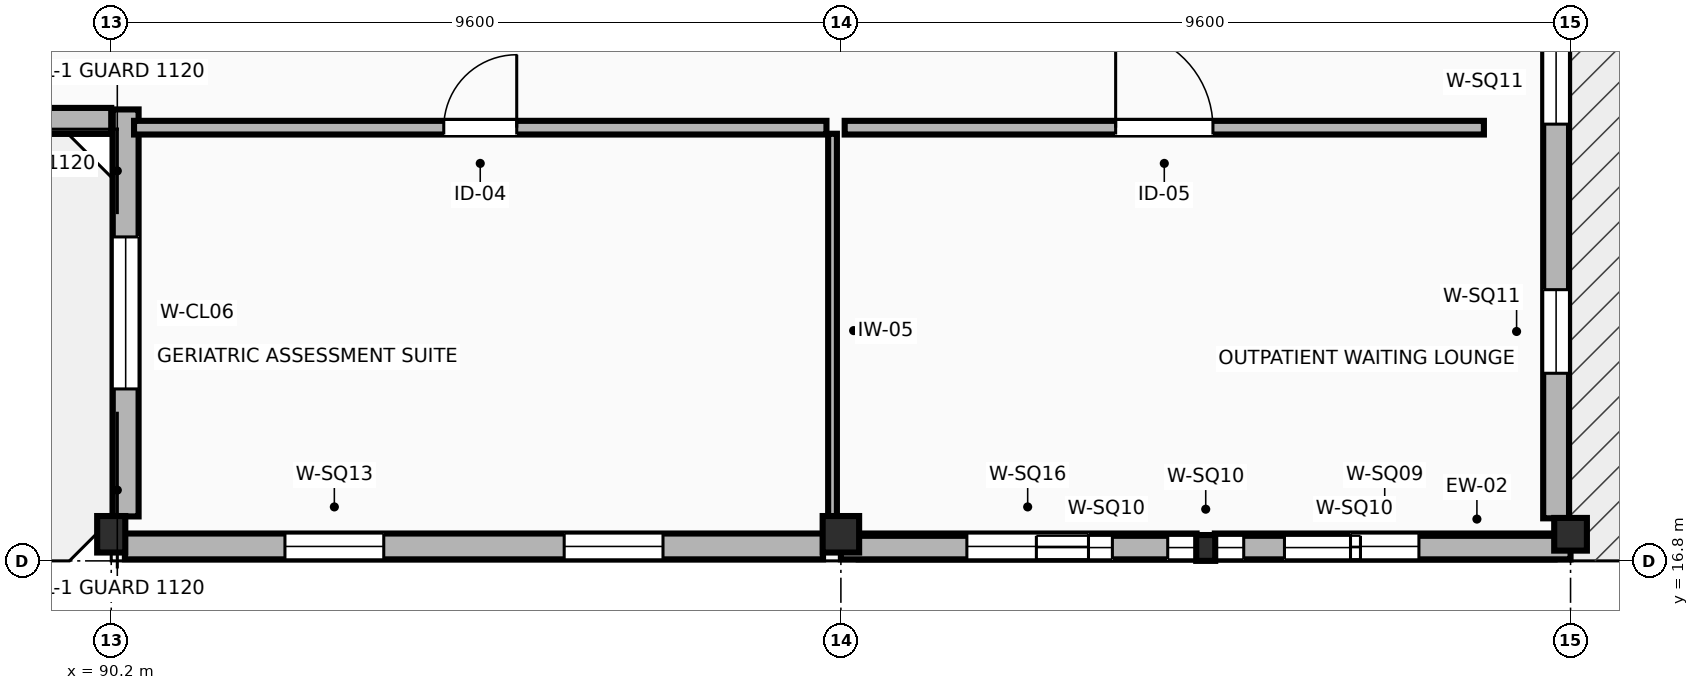
"""IFC4 building model, lengths in metres.
Left out: names, types, materials, properties, quantities, classifications, styles, units other than length and angle.
Written with IfcOpenShell. Run it as: python <this file> out.ifc"""

import sys

from ifc_helpers import new_model, si_unit, direction, frame, frame_2d, origin, origin_2d, place, context, subcontext, project, spatial, polyline, rectangle, outline, extrude, element, fill, save


model = new_model("IFC4")
c1 = context("Model", 3, precision=1e-05, world=origin(), true_north=direction((0.0, 1.0)))
c2 = subcontext(c1, "Body", "Model", "MODEL_VIEW")
j1 = project(units=[si_unit("LENGTHUNIT", "METRE"), si_unit("PLANEANGLEUNIT", "RADIAN")], contexts=[c1])
p1 = place(None, origin())
s1 = spatial("IfcSite", under=j1, at=p1, CompositionType="ELEMENT")
p2 = place(p1, origin())
s2 = spatial("IfcBuilding", under=s1, at=p2, CompositionType="ELEMENT")
p3 = place(p2, frame((0.0, 0.0, 18.0)))
s3 = spatial("IfcBuildingStorey", under=s2, at=p3, CompositionType="ELEMENT", Elevation=18.0)
p4 = place(p3, frame((90.2, 17.15, 0.0), z_axis=(0.0, 0.0, 1.0), x_axis=(1.0, 0.0, 0.0)))
e1 = element("IfcColumn", 1, at=p4, inside=s3, PredefinedType="COLUMN", context=c2, shape_type="SweptSolid", body=[
    extrude(rectangle(XDim=0.37, YDim=0.48, at=origin_2d()), origin(), (0.0, 0.0, 1.0), 4.2),
])
p5 = place(p3, frame((99.8, 17.15, 0.0), z_axis=(0.0, 0.0, 1.0), x_axis=(1.0, 0.0, 0.0)))
e2 = element("IfcColumn", 2, at=p5, inside=s3, PredefinedType="COLUMN", context=c2, shape_type="SweptSolid", body=[
    extrude(rectangle(XDim=0.48, YDim=0.48, at=origin_2d()), origin(), (0.0, 0.0, 1.0), 4.2),
])
p6 = place(p3, frame((109.4, 17.15, 0.0), z_axis=(0.0, 0.0, 1.0), x_axis=(1.0, 0.0, 0.0)))
e3 = element("IfcColumn", 3, at=p6, inside=s3, PredefinedType="COLUMN", context=c2, shape_type="SweptSolid", body=[
    extrude(rectangle(XDim=0.43, YDim=0.43, at=origin_2d()), origin(), (0.0, 0.0, 1.0), 4.2),
])
p7 = place(p3, frame((104.6, 16.97, 0.0), z_axis=(0.0, 0.0, 1.0), x_axis=(1.0, 0.0, 0.0)))
e4 = element("IfcColumn", 4, at=p7, inside=s3, PredefinedType="PILASTER", context=c2, shape_type="SweptSolid", body=[
    extrude(rectangle(XDim=0.25, YDim=0.34, at=origin_2d()), origin(), (0.0, 0.0, 1.0), 4.2),
])
p8 = place(p3, frame((80.6, 22.59, 0.0), z_axis=(0.0, 0.0, 1.0), x_axis=(1.0, 0.0, 0.0)))
e5 = element("IfcWall", 5, at=p8, inside=s3, PredefinedType="STANDARD", context=c2, shape_type="SweptSolid", body=[
    extrude(rectangle(XDim=9.6, YDim=0.34, at=frame_2d((4.8, 0.0))), origin(), (0.0, 0.0, 1.0), 3.94),
])
p9 = place(p8, frame((2.205, 0.0, 0.95)))
e6 = element("IfcOpeningElement", 6, at=p9, cuts=e5, PredefinedType="OPENING", context=c2, shape_type="SweptSolid", body=[
    extrude(rectangle(XDim=1.35, YDim=1.6, at=frame_2d((0.675, 0.8))), frame((0.0, 0.18, 0.0), z_axis=(0.0, -1.0, 0.0), x_axis=(1.0, 0.0, 0.0)), (0.0, 0.0, 1.0), 0.36),
])
p10 = place(p8, frame((6.045, 0.0, 0.95)))
e7 = element("IfcOpeningElement", 7, at=p10, cuts=e5, PredefinedType="OPENING", context=c2, shape_type="SweptSolid", body=[
    extrude(rectangle(XDim=1.35, YDim=1.6, at=frame_2d((0.675, 0.8))), frame((0.0, 0.18, 0.0), z_axis=(0.0, -1.0, 0.0), x_axis=(1.0, 0.0, 0.0)), (0.0, 0.0, 1.0), 0.36),
])
p11 = place(p3, frame((90.39, 22.74, 0.0), z_axis=(0.0, 0.0, 1.0), x_axis=(0.0, -1.0, 0.0)))
e8 = element("IfcWall", 8, at=p11, inside=s3, PredefinedType="STANDARD", context=c2, shape_type="SweptSolid", body=[
    extrude(rectangle(XDim=5.355, YDim=0.34, at=frame_2d((2.677, 0.0))), origin(), (0.0, 0.0, 1.0), 3.425),
])
p12 = place(p11, frame((1.677, 0.0, 0.95)))
e9 = element("IfcOpeningElement", 9, at=p12, cuts=e8, PredefinedType="OPENING", context=c2, shape_type="SweptSolid", body=[
    extrude(rectangle(XDim=2.0, YDim=1.6, at=frame_2d((1.0, 0.8))), frame((0.0, 0.18, 0.0), z_axis=(0.0, -1.0, 0.0), x_axis=(1.0, 0.0, 0.0)), (0.0, 0.0, 1.0), 0.36),
])
p13 = place(p3, frame((90.38, 16.99, 0.0), z_axis=(0.0, 0.0, 1.0), x_axis=(1.0, 0.0, 0.0)))
e10 = element("IfcWall", 10, at=p13, inside=s3, PredefinedType="STANDARD", context=c2, shape_type="SweptSolid", body=[
    extrude(rectangle(XDim=9.185, YDim=0.34, at=frame_2d((4.593, 0.0))), origin(), (0.0, 0.0, 1.0), 3.205),
])
p14 = place(p13, frame((2.105, 0.0, 0.95)))
e11 = element("IfcOpeningElement", 11, at=p14, cuts=e10, PredefinedType="OPENING", context=c2, shape_type="SweptSolid", body=[
    extrude(rectangle(XDim=1.3, YDim=1.3, at=frame_2d((0.65, 0.65))), frame((0.0, 0.18, 0.0), z_axis=(0.0, -1.0, 0.0), x_axis=(1.0, 0.0, 0.0)), (0.0, 0.0, 1.0), 0.36),
])
p15 = place(p13, frame((5.78, 0.0, 0.95)))
e12 = element("IfcOpeningElement", 12, at=p15, cuts=e10, PredefinedType="OPENING", context=c2, shape_type="SweptSolid", body=[
    extrude(rectangle(XDim=1.3, YDim=1.3, at=frame_2d((0.65, 0.65))), frame((0.0, 0.18, 0.0), z_axis=(0.0, -1.0, 0.0), x_axis=(1.0, 0.0, 0.0)), (0.0, 0.0, 1.0), 0.36),
])
p16 = place(p3, frame((100.035, 16.99, 0.0), z_axis=(0.0, 0.0, 1.0), x_axis=(1.0, 0.0, 0.0)))
e13 = element("IfcWall", 13, at=p16, inside=s3, PredefinedType="STANDARD", context=c2, shape_type="SweptSolid", body=[
    extrude(rectangle(XDim=4.445, YDim=0.34, at=frame_2d((2.223, 0.0))), origin(), (0.0, 0.0, 1.0), 3.94),
])
p17 = place(p16, frame((1.423, 0.0, 1.15)))
e14 = element("IfcOpeningElement", 14, at=p17, cuts=e13, PredefinedType="OPENING", context=c2, shape_type="SweptSolid", body=[
    extrude(rectangle(XDim=1.6, YDim=1.6, at=frame_2d((0.8, 0.8))), frame((0.0, 0.18, 0.0), z_axis=(0.0, -1.0, 0.0), x_axis=(1.0, 0.0, 0.0)), (0.0, 0.0, 1.0), 0.36),
])
p18 = place(p3, frame((104.72, 16.99, 0.0), z_axis=(0.0, 0.0, 1.0), x_axis=(1.0, 0.0, 0.0)))
e15 = element("IfcWall", 15, at=p18, inside=s3, PredefinedType="STANDARD", context=c2, shape_type="SweptSolid", body=[
    extrude(rectangle(XDim=4.47, YDim=0.34, at=frame_2d((2.235, 0.0))), origin(), (0.0, 0.0, 1.0), 3.94),
])
p19 = place(p18, frame((1.785, 0.0, 1.15)))
e16 = element("IfcOpeningElement", 16, at=p19, cuts=e15, PredefinedType="OPENING", context=c2, shape_type="SweptSolid", body=[
    extrude(rectangle(XDim=0.9, YDim=0.9, at=frame_2d((0.45, 0.45))), frame((0.0, 0.18, 0.0), z_axis=(0.0, -1.0, 0.0), x_axis=(1.0, 0.0, 0.0)), (0.0, 0.0, 1.0), 0.36),
])
p20 = place(p3, frame((109.21, 17.36, 0.0), z_axis=(0.0, 0.0, 1.0), x_axis=(0.0, 1.0, 0.0)))
e17 = element("IfcWall", 17, at=p20, inside=s3, PredefinedType="STANDARD", context=c2, shape_type="SweptSolid", body=[
    extrude(rectangle(XDim=8.195, YDim=0.34, at=frame_2d((4.097, 0.0))), origin(), (0.0, 0.0, 1.0), 3.035),
])
p21 = place(p20, frame((1.908, 0.0, 1.15)))
e18 = element("IfcOpeningElement", 18, at=p21, cuts=e17, PredefinedType="OPENING", context=c2, shape_type="SweptSolid", body=[
    extrude(rectangle(XDim=1.1, YDim=1.1, at=frame_2d((0.55, 0.55))), frame((0.0, 0.18, 0.0), z_axis=(0.0, -1.0, 0.0), x_axis=(1.0, 0.0, 0.0)), (0.0, 0.0, 1.0), 0.36),
])
p22 = place(p20, frame((5.187, 0.0, 1.15)))
e19 = element("IfcOpeningElement", 19, at=p22, cuts=e17, PredefinedType="OPENING", context=c2, shape_type="SweptSolid", body=[
    extrude(rectangle(XDim=1.1, YDim=1.1, at=frame_2d((0.55, 0.55))), frame((0.0, 0.18, 0.0), z_axis=(0.0, -1.0, 0.0), x_axis=(1.0, 0.0, 0.0)), (0.0, 0.0, 1.0), 0.36),
])
p23 = place(p3, frame((99.8, 16.975, 4.2), z_axis=(0.0, 0.0, 1.0), x_axis=(1.0, 0.0, 0.0)))
e20 = element("IfcWall", 20, at=p23, inside=s3, PredefinedType="STANDARD", context=c2, shape_type="SweptSolid", body=[
    extrude(outline(polyline([(0.0, 0.0), (9.6, 0.0), (9.6, 0.0), (4.8, 8.19), (0.0, 0.0), (0.0, 0.0)])), frame((0.0, 0.155, 0.0), z_axis=(0.0, -1.0, 0.0), x_axis=(1.0, 0.0, 0.0)), (0.0, 0.0, 1.0), 0.31),
])
p24 = place(p23, frame((2.572, 0.0, 0.75)))
e21 = element("IfcOpeningElement", 21, at=p24, cuts=e20, PredefinedType="OPENING", context=c2, shape_type="SweptSolid", body=[
    extrude(rectangle(XDim=1.0, YDim=1.0, at=frame_2d((0.5, 0.5))), frame((0.0, 0.165, 0.0), z_axis=(0.0, -1.0, 0.0), x_axis=(1.0, 0.0, 0.0)), (0.0, 0.0, 1.0), 0.33),
])
p25 = place(p23, frame((5.836, 0.0, 1.55)))
e22 = element("IfcOpeningElement", 22, at=p25, cuts=e20, PredefinedType="OPENING", context=c2, shape_type="SweptSolid", body=[
    extrude(rectangle(XDim=1.0, YDim=1.0, at=frame_2d((0.5, 0.5))), frame((0.0, 0.165, 0.0), z_axis=(0.0, -1.0, 0.0), x_axis=(1.0, 0.0, 0.0)), (0.0, 0.0, 1.0), 0.33),
])
p26 = place(p23, frame((4.3, 0.0, 3.35)))
e23 = element("IfcOpeningElement", 23, at=p26, cuts=e20, PredefinedType="OPENING", context=c2, shape_type="SweptSolid", body=[
    extrude(rectangle(XDim=1.0, YDim=1.0, at=frame_2d((0.5, 0.5))), frame((0.0, 0.165, 0.0), z_axis=(0.0, -1.0, 0.0), x_axis=(1.0, 0.0, 0.0)), (0.0, 0.0, 1.0), 0.33),
])
p27 = place(p3, frame((90.5, 22.5, 0.0), z_axis=(0.0, 0.0, 1.0), x_axis=(1.0, 0.0, 0.0)))
e24 = element("IfcWall", 24, at=p27, inside=s3, PredefinedType="PARTITIONING", context=c2, shape_type="SweptSolid", body=[
    extrude(rectangle(XDim=9.11, YDim=0.18, at=frame_2d((4.555, 0.0))), origin(), (0.0, 0.0, 1.0), 3.94),
])
p28 = place(p27, frame((4.075, 0.0, 0.0)))
e25 = element("IfcOpeningElement", 25, at=p28, cuts=e24, PredefinedType="OPENING", context=c2, shape_type="SweptSolid", body=[
    extrude(rectangle(XDim=0.96, YDim=2.1, at=frame_2d((0.48, 1.05))), frame((0.0, 0.1, 0.0), z_axis=(0.0, -1.0, 0.0), x_axis=(1.0, 0.0, 0.0)), (0.0, 0.0, 1.0), 0.2),
])
p29 = place(p3, frame((99.69, 22.42, 0.0), z_axis=(0.0, 0.0, 1.0), x_axis=(0.0, -1.0, 0.0)))
e26 = element("IfcWall", 26, at=p29, inside=s3, PredefinedType="PARTITIONING", context=c2, shape_type="SweptSolid", body=[
    extrude(rectangle(XDim=5.18, YDim=0.115, at=frame_2d((2.59, 0.0))), origin(), (0.0, 0.0, 1.0), 2.985),
])
p30 = place(p3, frame((99.85, 22.5, 0.0), z_axis=(0.0, 0.0, 1.0), x_axis=(1.0, 0.0, 0.0)))
e27 = element("IfcWall", 27, at=p30, inside=s3, PredefinedType="PARTITIONING", context=c2, shape_type="SweptSolid", body=[
    extrude(rectangle(XDim=8.41, YDim=0.18, at=frame_2d((4.205, 0.0))), origin(), (0.0, 0.0, 1.0), 3.94),
])
p31 = place(p30, frame((3.565, 0.0, 0.0)))
e28 = element("IfcOpeningElement", 28, at=p31, cuts=e27, PredefinedType="OPENING", context=c2, shape_type="SweptSolid", body=[
    extrude(rectangle(XDim=1.28, YDim=2.25, at=frame_2d((0.64, 1.125))), frame((0.0, 0.1, 0.0), z_axis=(0.0, -1.0, 0.0), x_axis=(1.0, 0.0, 0.0)), (0.0, 0.0, 1.0), 0.2),
])
p32 = place(p12, origin())
e29 = element("IfcWindow", 29, at=p32, inside=s3, PartitioningType="SINGLE_PANEL", PredefinedType="WINDOW", context=c2, shape_type="SweptSolid", body=[
    extrude(rectangle(XDim=2.0, YDim=1.6, at=frame_2d((1.0, 0.8))), frame((0.0, 0.03, 0.0), z_axis=(0.0, -1.0, 0.0), x_axis=(1.0, 0.0, 0.0)), (0.0, 0.0, 1.0), 0.06),
])
fill(e9, e29)
p33 = place(p14, origin())
e30 = element("IfcWindow", 30, at=p33, inside=s3, PartitioningType="SINGLE_PANEL", PredefinedType="WINDOW", context=c2, shape_type="SweptSolid", body=[
    extrude(rectangle(XDim=1.3, YDim=1.3, at=frame_2d((0.65, 0.65))), frame((0.0, 0.03, 0.0), z_axis=(0.0, -1.0, 0.0), x_axis=(1.0, 0.0, 0.0)), (0.0, 0.0, 1.0), 0.06),
])
fill(e11, e30)
p34 = place(p15, origin())
e31 = element("IfcWindow", 31, at=p34, inside=s3, PartitioningType="SINGLE_PANEL", PredefinedType="WINDOW", context=c2, shape_type="SweptSolid", body=[
    extrude(rectangle(XDim=1.3, YDim=1.3, at=frame_2d((0.65, 0.65))), frame((0.0, 0.03, 0.0), z_axis=(0.0, -1.0, 0.0), x_axis=(1.0, 0.0, 0.0)), (0.0, 0.0, 1.0), 0.06),
])
fill(e12, e31)
p35 = place(p17, origin())
e32 = element("IfcWindow", 32, at=p35, inside=s3, PartitioningType="SINGLE_PANEL", PredefinedType="WINDOW", context=c2, shape_type="SweptSolid", body=[
    extrude(rectangle(XDim=1.6, YDim=1.6, at=frame_2d((0.8, 0.8))), frame((0.0, 0.03, 0.0), z_axis=(0.0, -1.0, 0.0), x_axis=(1.0, 0.0, 0.0)), (0.0, 0.0, 1.0), 0.06),
])
fill(e14, e32)
p36 = place(p19, origin())
e33 = element("IfcWindow", 33, at=p36, inside=s3, PartitioningType="SINGLE_PANEL", PredefinedType="WINDOW", context=c2, shape_type="SweptSolid", body=[
    extrude(rectangle(XDim=0.9, YDim=0.9, at=frame_2d((0.45, 0.45))), frame((0.0, 0.03, 0.0), z_axis=(0.0, -1.0, 0.0), x_axis=(1.0, 0.0, 0.0)), (0.0, 0.0, 1.0), 0.06),
])
fill(e16, e33)
p37 = place(p21, origin())
e34 = element("IfcWindow", 34, at=p37, inside=s3, PartitioningType="SINGLE_PANEL", PredefinedType="WINDOW", context=c2, shape_type="SweptSolid", body=[
    extrude(rectangle(XDim=1.1, YDim=1.1, at=frame_2d((0.55, 0.55))), frame((0.0, 0.03, 0.0), z_axis=(0.0, -1.0, 0.0), x_axis=(1.0, 0.0, 0.0)), (0.0, 0.0, 1.0), 0.06),
])
fill(e18, e34)
p38 = place(p22, origin())
e35 = element("IfcWindow", 35, at=p38, inside=s3, PartitioningType="SINGLE_PANEL", PredefinedType="WINDOW", context=c2, shape_type="SweptSolid", body=[
    extrude(rectangle(XDim=1.1, YDim=1.1, at=frame_2d((0.55, 0.55))), frame((0.0, 0.03, 0.0), z_axis=(0.0, -1.0, 0.0), x_axis=(1.0, 0.0, 0.0)), (0.0, 0.0, 1.0), 0.06),
])
fill(e19, e35)
p39 = place(p24, origin())
e36 = element("IfcWindow", 36, at=p39, inside=s3, PartitioningType="SINGLE_PANEL", PredefinedType="WINDOW", context=c2, shape_type="SweptSolid", body=[
    extrude(rectangle(XDim=1.0, YDim=1.0, at=frame_2d((0.5, 0.5))), frame((0.0, 0.03, 0.0), z_axis=(0.0, -1.0, 0.0), x_axis=(1.0, 0.0, 0.0)), (0.0, 0.0, 1.0), 0.06),
])
fill(e21, e36)
p40 = place(p25, origin())
e37 = element("IfcWindow", 37, at=p40, inside=s3, PartitioningType="SINGLE_PANEL", PredefinedType="WINDOW", context=c2, shape_type="SweptSolid", body=[
    extrude(rectangle(XDim=1.0, YDim=1.0, at=frame_2d((0.5, 0.5))), frame((0.0, 0.03, 0.0), z_axis=(0.0, -1.0, 0.0), x_axis=(1.0, 0.0, 0.0)), (0.0, 0.0, 1.0), 0.06),
])
fill(e22, e37)
p41 = place(p26, origin())
e38 = element("IfcWindow", 38, at=p41, inside=s3, PartitioningType="SINGLE_PANEL", PredefinedType="WINDOW", context=c2, shape_type="SweptSolid", body=[
    extrude(rectangle(XDim=1.0, YDim=1.0, at=frame_2d((0.5, 0.5))), frame((0.0, 0.03, 0.0), z_axis=(0.0, -1.0, 0.0), x_axis=(1.0, 0.0, 0.0)), (0.0, 0.0, 1.0), 0.06),
])
fill(e23, e38)
p42 = place(p28, origin())
e39 = element("IfcDoor", 39, at=p42, inside=s3, OperationType="SINGLE_SWING_RIGHT", PredefinedType="DOOR", context=c2, shape_type="SweptSolid", body=[
    extrude(rectangle(XDim=0.96, YDim=2.1, at=frame_2d((0.48, 1.05))), frame((0.0, 0.025, 0.0), z_axis=(0.0, -1.0, 0.0), x_axis=(1.0, 0.0, 0.0)), (0.0, 0.0, 1.0), 0.05),
])
fill(e25, e39)
p43 = place(p31, origin())
e40 = element("IfcDoor", 40, at=p43, inside=s3, OperationType="SINGLE_SWING_LEFT", PredefinedType="DOOR", context=c2, shape_type="SweptSolid", body=[
    extrude(rectangle(XDim=1.28, YDim=2.25, at=frame_2d((0.64, 1.125))), frame((0.0, 0.025, 0.0), z_axis=(0.0, -1.0, 0.0), x_axis=(1.0, 0.0, 0.0)), (0.0, 0.0, 1.0), 0.05),
])
fill(e28, e40)
save(model, sys.argv[1])
